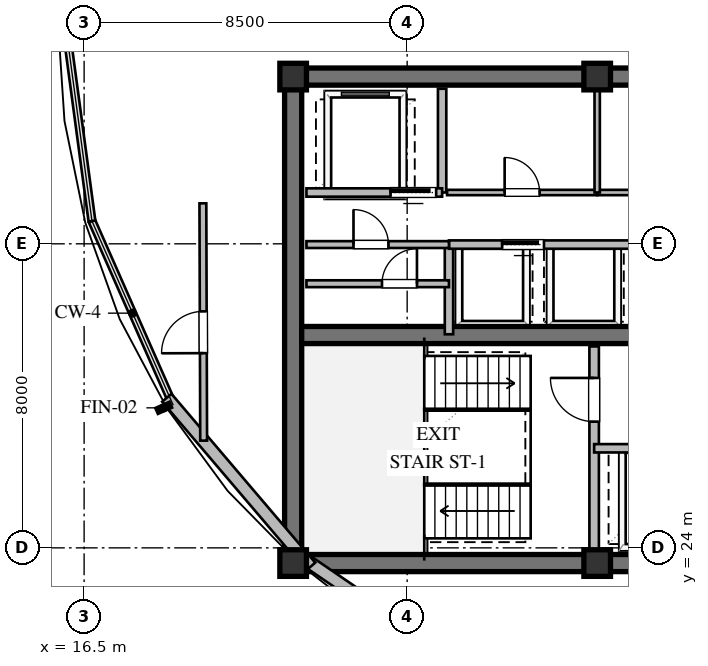
"""IFC4 building model, lengths in metres.
Left out: names, types, materials, properties, quantities, classifications, styles, units other than length and angle.
Written with IfcOpenShell. Run it as: python <this file> out.ifc"""

import sys

from ifc_helpers import new_model, si_unit, direction, frame, frame_2d, origin, origin_2d, place, context, subcontext, project, spatial, rectangle, extrude, element, fill, save


model = new_model("IFC4")
c1 = context("Model", 3, precision=1e-05, world=origin(), true_north=direction((0.0, 1.0)))
c2 = subcontext(c1, "Body", "Model", "MODEL_VIEW")
j1 = project(units=[si_unit("LENGTHUNIT", "METRE"), si_unit("PLANEANGLEUNIT", "RADIAN")], contexts=[c1])
p1 = place(None, origin())
s1 = spatial("IfcSite", under=j1, at=p1, CompositionType="ELEMENT")
p2 = place(p1, origin())
s2 = spatial("IfcBuilding", under=s1, at=p2, CompositionType="ELEMENT")
p3 = place(p2, frame((0.0, 0.0, 266.2)))
s3 = spatial("IfcBuildingStorey", under=s2, at=p3, CompositionType="ELEMENT", Elevation=266.2)
for number, where, z_axis, x_axis in (
    (1, (21.775, 23.6, 0.0), (0.0, 0.0, 1.0), (1.0, 0.0, 0.0)),
    (2, (21.775, 36.4, 0.0), (0.0, 0.0, 1.0), (1.0, 0.0, 0.0)),
):
    element("IfcWall", number, at=place(p3, frame(where, z_axis=z_axis, x_axis=x_axis)), inside=s3, PredefinedType="SHEAR", context=c2, shape_type="SweptSolid", body=[
        extrude(rectangle(XDim=22.45, YDim=0.45, at=frame_2d((11.225, 0.0))), origin(), (0.0, 0.0, 1.0), 3.56),
    ])
p4 = place(p3, frame((22.0, 23.825, 0.0), z_axis=(0.0, 0.0, 1.0), x_axis=(0.0, 1.0, 0.0)))
e3 = element("IfcWall", 3, at=p4, inside=s3, PredefinedType="SHEAR", context=c2, shape_type="SweptSolid", body=[
    extrude(rectangle(XDim=12.35, YDim=0.45, at=frame_2d((6.175, 0.0))), origin(), (0.0, 0.0, 1.0), 3.56),
])
p5 = place(p3, frame((22.225, 29.6, 0.0), z_axis=(0.0, 0.0, 1.0), x_axis=(1.0, 0.0, 0.0)))
e4 = element("IfcWall", 4, at=p5, inside=s3, PredefinedType="SHEAR", context=c2, shape_type="SweptSolid", body=[
    extrude(rectangle(XDim=21.55, YDim=0.45, at=frame_2d((10.775, 0.0))), origin(), (0.0, 0.0, 1.0), 3.56),
])
p6 = place(p5, frame((12.225, 0.0, 0.0)))
e5 = element("IfcOpeningElement", 5, at=p6, cuts=e4, PredefinedType="OPENING", context=c2, shape_type="SweptSolid", body=[
    extrude(rectangle(XDim=1.15, YDim=2.1, at=frame_2d((0.575, 1.05))), frame((0.0, 0.235, 0.0), z_axis=(0.0, -1.0, 0.0), x_axis=(1.0, 0.0, 0.0)), (0.0, 0.0, 1.0), 0.47),
])
for number, where, z_axis, x_axis in (
    (6, (22.0, 23.6, 0.0), (0.0, 0.0, 1.0), (1.0, 0.0, 0.0)),
    (7, (30.0, 23.6, 0.0), (0.0, 0.0, 1.0), (1.0, 0.0, 0.0)),
    (8, (30.0, 36.4, 0.0), (0.0, 0.0, 1.0), (1.0, 0.0, 0.0)),
    (9, (22.0, 36.4, 0.0), (0.0, 0.0, 1.0), (1.0, 0.0, 0.0)),
):
    element("IfcColumn", number, at=place(p3, frame(where, z_axis=z_axis, x_axis=x_axis)), inside=s3, PredefinedType="COLUMN", context=c2, shape_type="SweptSolid", body=[
        extrude(rectangle(XDim=0.7, YDim=0.7, at=origin_2d()), origin(), (0.0, 0.0, 1.0), 3.8),
    ])
p7 = place(p3, frame((27.093, 20.428, 0.0), z_axis=(0.0, 0.0, 1.0), x_axis=(-0.826047009588, 0.563601222454, 0.0)))
e10 = element("IfcWall", 10, at=p7, inside=s3, PredefinedType="STANDARD", context=c2, shape_type="SweptSolid", body=[
    extrude(rectangle(XDim=6.074, YDim=0.32, at=frame_2d((3.037, 0.0))), origin(), (0.0, 0.0, 1.0), 2.35),
])
p8 = place(p3, frame((22.46, 23.506, 0.0), z_axis=(0.0, 0.0, 1.0), x_axis=(-0.648393724369, 0.761305180725, 0.0)))
e11 = element("IfcWall", 11, at=p8, inside=s3, PredefinedType="STANDARD", context=c2, shape_type="SweptSolid", body=[
    extrude(rectangle(XDim=5.836, YDim=0.32, at=frame_2d((2.918, 0.0))), origin(), (0.0, 0.0, 1.0), 2.7),
])
p9 = place(p3, frame((29.92, 23.9, 0.0), z_axis=(0.0, 0.0, 1.0), x_axis=(0.0, 1.0, 0.0)))
e12 = element("IfcWall", 12, at=p9, inside=s3, PredefinedType="SOLIDWALL", context=c2, shape_type="SweptSolid", body=[
    extrude(rectangle(XDim=5.4, YDim=0.25, at=frame_2d((2.7, 0.0))), origin(), (0.0, 0.0, 1.0), 3.006),
])
p10 = place(p9, frame((3.421, 0.0, 0.0)))
e13 = element("IfcOpeningElement", 13, at=p10, cuts=e12, PredefinedType="OPENING", context=c2, shape_type="SweptSolid", body=[
    extrude(rectangle(XDim=1.15, YDim=2.1, at=frame_2d((0.575, 1.05))), frame((0.0, 0.135, 0.0), z_axis=(0.0, -1.0, 0.0), x_axis=(1.0, 0.0, 0.0)), (0.0, 0.0, 1.0), 0.27),
])
p11 = place(p3, frame((29.92, 26.62, 0.0), z_axis=(0.0, 0.0, 1.0), x_axis=(1.0, 0.0, 0.0)))
e14 = element("IfcWall", 14, at=p11, inside=s3, PredefinedType="SOLIDWALL", context=c2, shape_type="SweptSolid", body=[
    extrude(rectangle(XDim=6.16, YDim=0.22, at=frame_2d((3.08, 0.0))), origin(), (0.0, 0.0, 1.0), 3.56),
])
p12 = place(p11, frame((0.99, 0.0, 0.0)))
e15 = element("IfcOpeningElement", 15, at=p12, cuts=e14, PredefinedType="OPENING", context=c2, shape_type="SweptSolid", body=[
    extrude(rectangle(XDim=1.1, YDim=2.1, at=frame_2d((0.55, 1.05))), frame((0.0, 0.12, 0.0), z_axis=(0.0, -1.0, 0.0), x_axis=(1.0, 0.0, 0.0)), (0.0, 0.0, 1.0), 0.24),
])
p13 = place(p11, frame((4.07, 0.0, 0.0)))
e16 = element("IfcOpeningElement", 16, at=p13, cuts=e14, PredefinedType="OPENING", context=c2, shape_type="SweptSolid", body=[
    extrude(rectangle(XDim=1.1, YDim=2.1, at=frame_2d((0.55, 1.05))), frame((0.0, 0.12, 0.0), z_axis=(0.0, -1.0, 0.0), x_axis=(1.0, 0.0, 0.0)), (0.0, 0.0, 1.0), 0.24),
])
p14 = place(p3, frame((25.92, 33.35, 0.0), z_axis=(0.0, 0.0, 1.0), x_axis=(0.0, 1.0, 0.0)))
e17 = element("IfcWall", 17, at=p14, inside=s3, PredefinedType="SOLIDWALL", context=c2, shape_type="SweptSolid", body=[
    extrude(rectangle(XDim=2.73, YDim=0.22, at=frame_2d((1.365, 0.0))), origin(), (0.0, 0.0, 1.0), 3.56),
])
p15 = place(p3, frame((22.35, 33.35, 0.0), z_axis=(0.0, 0.0, 1.0), x_axis=(1.0, 0.0, 0.0)))
e18 = element("IfcWall", 18, at=p15, inside=s3, PredefinedType="SOLIDWALL", context=c2, shape_type="SweptSolid", body=[
    extrude(rectangle(XDim=3.57, YDim=0.22, at=frame_2d((1.785, 0.0))), origin(), (0.0, 0.0, 1.0), 3.56),
])
p16 = place(p15, frame((2.213, 0.0, 0.0)))
e19 = element("IfcOpeningElement", 19, at=p16, cuts=e18, PredefinedType="OPENING", context=c2, shape_type="SweptSolid", body=[
    extrude(rectangle(XDim=1.2, YDim=2.1, at=frame_2d((0.6, 1.05))), frame((0.0, 0.12, 0.0), z_axis=(0.0, -1.0, 0.0), x_axis=(1.0, 0.0, 0.0)), (0.0, 0.0, 1.0), 0.24),
])
p17 = place(p3, frame((26.1, 29.62, 0.0), z_axis=(0.0, 0.0, 1.0), x_axis=(0.0, 1.0, 0.0)))
e20 = element("IfcWall", 20, at=p17, inside=s3, PredefinedType="SOLIDWALL", context=c2, shape_type="SweptSolid", body=[
    extrude(rectangle(XDim=2.36, YDim=0.22, at=frame_2d((1.18, 0.0))), origin(), (0.0, 0.0, 1.0), 3.56),
])
p18 = place(p3, frame((26.1, 31.98, 0.0), z_axis=(0.0, 0.0, 1.0), x_axis=(1.0, 0.0, 0.0)))
e21 = element("IfcWall", 21, at=p18, inside=s3, PredefinedType="SOLIDWALL", context=c2, shape_type="SweptSolid", body=[
    extrude(rectangle(XDim=7.8, YDim=0.22, at=frame_2d((3.9, 0.0))), origin(), (0.0, 0.0, 1.0), 3.56),
])
p19 = place(p18, frame((1.4, 0.0, 0.0)))
e22 = element("IfcOpeningElement", 22, at=p19, cuts=e21, PredefinedType="OPENING", context=c2, shape_type="SweptSolid", body=[
    extrude(rectangle(XDim=1.1, YDim=2.1, at=frame_2d((0.55, 1.05))), frame((0.0, 0.12, 0.0), z_axis=(0.0, -1.0, 0.0), x_axis=(1.0, 0.0, 0.0)), (0.0, 0.0, 1.0), 0.24),
])
p20 = place(p18, frame((5.066, 0.0, 0.0)))
e23 = element("IfcOpeningElement", 23, at=p20, cuts=e21, PredefinedType="OPENING", context=c2, shape_type="SweptSolid", body=[
    extrude(rectangle(XDim=1.1, YDim=2.1, at=frame_2d((0.55, 1.05))), frame((0.0, 0.12, 0.0), z_axis=(0.0, -1.0, 0.0), x_axis=(1.0, 0.0, 0.0)), (0.0, 0.0, 1.0), 0.24),
])
p21 = place(p3, frame((26.05, 33.35, 0.0), z_axis=(0.0, 0.0, 1.0), x_axis=(1.0, 0.0, 0.0)))
e24 = element("IfcWall", 24, at=p21, inside=s3, PredefinedType="PARTITIONING", context=c2, shape_type="SweptSolid", body=[
    extrude(rectangle(XDim=3.95, YDim=0.14, at=frame_2d((1.975, 0.0))), origin(), (0.0, 0.0, 1.0), 3.56),
])
p22 = place(p21, frame((1.515, 0.0, 0.0)))
e25 = element("IfcOpeningElement", 25, at=p22, cuts=e24, PredefinedType="OPENING", context=c2, shape_type="SweptSolid", body=[
    extrude(rectangle(XDim=0.92, YDim=2.1, at=frame_2d((0.46, 1.05))), frame((0.0, 0.08, 0.0), z_axis=(0.0, -1.0, 0.0), x_axis=(1.0, 0.0, 0.0)), (0.0, 0.0, 1.0), 0.16),
])
p23 = place(p3, frame((30.0, 33.35, 0.0), z_axis=(0.0, 0.0, 1.0), x_axis=(1.0, 0.0, 0.0)))
e26 = element("IfcWall", 26, at=p23, inside=s3, PredefinedType="PARTITIONING", context=c2, shape_type="SweptSolid", body=[
    extrude(rectangle(XDim=3.92, YDim=0.14, at=frame_2d((1.96, 0.0))), origin(), (0.0, 0.0, 1.0), 3.56),
])
p24 = place(p23, frame((1.5, 0.0, 0.0)))
e27 = element("IfcOpeningElement", 27, at=p24, cuts=e26, PredefinedType="OPENING", context=c2, shape_type="SweptSolid", body=[
    extrude(rectangle(XDim=0.92, YDim=2.1, at=frame_2d((0.46, 1.05))), frame((0.0, 0.08, 0.0), z_axis=(0.0, -1.0, 0.0), x_axis=(1.0, 0.0, 0.0)), (0.0, 0.0, 1.0), 0.16),
])
p25 = place(p3, frame((30.0, 33.35, 0.0), z_axis=(0.0, 0.0, 1.0), x_axis=(0.0, 1.0, 0.0)))
e28 = element("IfcWall", 28, at=p25, inside=s3, PredefinedType="PARTITIONING", context=c2, shape_type="SweptSolid", body=[
    extrude(rectangle(XDim=2.75, YDim=0.14, at=frame_2d((1.375, 0.0))), origin(), (0.0, 0.0, 1.0), 3.56),
])
p26 = place(p3, frame((22.35, 30.95, 0.0), z_axis=(0.0, 0.0, 1.0), x_axis=(1.0, 0.0, 0.0)))
e29 = element("IfcWall", 29, at=p26, inside=s3, PredefinedType="PARTITIONING", context=c2, shape_type="SweptSolid", body=[
    extrude(rectangle(XDim=3.75, YDim=0.18, at=frame_2d((1.875, 0.0))), origin(), (0.0, 0.0, 1.0), 3.56),
])
p27 = place(p26, frame((1.988, 0.0, 0.0)))
e30 = element("IfcOpeningElement", 30, at=p27, cuts=e29, PredefinedType="OPENING", context=c2, shape_type="SweptSolid", body=[
    extrude(rectangle(XDim=0.92, YDim=2.1, at=frame_2d((0.46, 1.05))), frame((0.0, 0.1, 0.0), z_axis=(0.0, -1.0, 0.0), x_axis=(1.0, 0.0, 0.0)), (0.0, 0.0, 1.0), 0.2),
])
p28 = place(p3, frame((22.35, 31.98, 0.0), z_axis=(0.0, 0.0, 1.0), x_axis=(1.0, 0.0, 0.0)))
e31 = element("IfcWall", 31, at=p28, inside=s3, PredefinedType="PARTITIONING", context=c2, shape_type="SweptSolid", body=[
    extrude(rectangle(XDim=3.75, YDim=0.18, at=frame_2d((1.875, 0.0))), origin(), (0.0, 0.0, 1.0), 3.56),
])
p29 = place(p28, frame((1.238, 0.0, 0.0)))
e32 = element("IfcOpeningElement", 32, at=p29, cuts=e31, PredefinedType="OPENING", context=c2, shape_type="SweptSolid", body=[
    extrude(rectangle(XDim=0.92, YDim=2.1, at=frame_2d((0.46, 1.05))), frame((0.0, 0.1, 0.0), z_axis=(0.0, -1.0, 0.0), x_axis=(1.0, 0.0, 0.0)), (0.0, 0.0, 1.0), 0.2),
])
p30 = place(p3, frame((19.645, 26.821, 0.0), z_axis=(0.0, 0.0, 1.0), x_axis=(-0.003245212815, 0.999994734283, 0.0)))
e33 = element("IfcWall", 33, at=p30, inside=s3, PredefinedType="PARTITIONING", context=c2, shape_type="SweptSolid", body=[
    extrude(rectangle(XDim=6.244, YDim=0.18, at=frame_2d((3.122, 0.0))), origin(), (0.0, 0.0, 1.0), 3.017),
])
p31 = place(p30, frame((2.302, 0.0, 0.0)))
e34 = element("IfcOpeningElement", 34, at=p31, cuts=e33, PredefinedType="OPENING", context=c2, shape_type="SweptSolid", body=[
    extrude(rectangle(XDim=1.1, YDim=2.1, at=frame_2d((0.55, 1.05))), frame((0.0, 0.1, 0.0), z_axis=(0.0, -1.0, 0.0), x_axis=(1.0, 0.0, 0.0)), (0.0, 0.0, 1.0), 0.2),
])
p32 = place(p10, origin())
e35 = element("IfcDoor", 35, at=p32, inside=s3, OperationType="SINGLE_SWING_RIGHT", PredefinedType="DOOR", context=c2, shape_type="SweptSolid", body=[
    extrude(rectangle(XDim=1.15, YDim=2.1, at=frame_2d((0.575, 1.05))), frame((0.0, 0.025, 0.0), z_axis=(0.0, -1.0, 0.0), x_axis=(1.0, 0.0, 0.0)), (0.0, 0.0, 1.0), 0.05),
])
fill(e13, e35)
p33 = place(p16, origin())
e36 = element("IfcDoor", 36, at=p33, inside=s3, OperationType="SLIDING_TO_LEFT", PredefinedType="DOOR", context=c2, shape_type="SweptSolid", body=[
    extrude(rectangle(XDim=1.2, YDim=2.1, at=frame_2d((0.6, 1.05))), frame((0.0, 0.025, 0.0), z_axis=(0.0, -1.0, 0.0), x_axis=(1.0, 0.0, 0.0)), (0.0, 0.0, 1.0), 0.05),
])
fill(e19, e36)
p34 = place(p19, origin())
e37 = element("IfcDoor", 37, at=p34, inside=s3, OperationType="SLIDING_TO_LEFT", PredefinedType="DOOR", context=c2, shape_type="SweptSolid", body=[
    extrude(rectangle(XDim=1.1, YDim=2.1, at=frame_2d((0.55, 1.05))), frame((0.0, 0.025, 0.0), z_axis=(0.0, -1.0, 0.0), x_axis=(1.0, 0.0, 0.0)), (0.0, 0.0, 1.0), 0.05),
])
fill(e22, e37)
p35 = place(p22, origin())
e38 = element("IfcDoor", 38, at=p35, inside=s3, OperationType="SINGLE_SWING_LEFT", PredefinedType="DOOR", context=c2, shape_type="SweptSolid", body=[
    extrude(rectangle(XDim=0.92, YDim=2.1, at=frame_2d((0.46, 1.05))), frame((0.0, 0.025, 0.0), z_axis=(0.0, -1.0, 0.0), x_axis=(1.0, 0.0, 0.0)), (0.0, 0.0, 1.0), 0.05),
])
fill(e25, e38)
p36 = place(p29, origin())
e39 = element("IfcDoor", 39, at=p36, inside=s3, OperationType="SINGLE_SWING_LEFT", PredefinedType="DOOR", context=c2, shape_type="SweptSolid", body=[
    extrude(rectangle(XDim=0.92, YDim=2.1, at=frame_2d((0.46, 1.05))), frame((0.0, 0.025, 0.0), z_axis=(0.0, -1.0, 0.0), x_axis=(1.0, 0.0, 0.0)), (0.0, 0.0, 1.0), 0.05),
])
fill(e32, e39)
p37 = place(p27, origin())
e40 = element("IfcDoor", 40, at=p37, inside=s3, OperationType="SINGLE_SWING_RIGHT", PredefinedType="DOOR", context=c2, shape_type="SweptSolid", body=[
    extrude(rectangle(XDim=0.92, YDim=2.1, at=frame_2d((0.46, 1.05))), frame((0.0, 0.025, 0.0), z_axis=(0.0, -1.0, 0.0), x_axis=(1.0, 0.0, 0.0)), (0.0, 0.0, 1.0), 0.05),
])
fill(e30, e40)
p38 = place(p31, origin())
e41 = element("IfcDoor", 41, at=p38, inside=s3, OperationType="SINGLE_SWING_LEFT", PredefinedType="DOOR", context=c2, shape_type="SweptSolid", body=[
    extrude(rectangle(XDim=1.1, YDim=2.1, at=frame_2d((0.55, 1.05))), frame((0.0, 0.025, 0.0), z_axis=(0.0, -1.0, 0.0), x_axis=(1.0, 0.0, 0.0)), (0.0, 0.0, 1.0), 0.05),
])
fill(e34, e41)
save(model, sys.argv[1])
